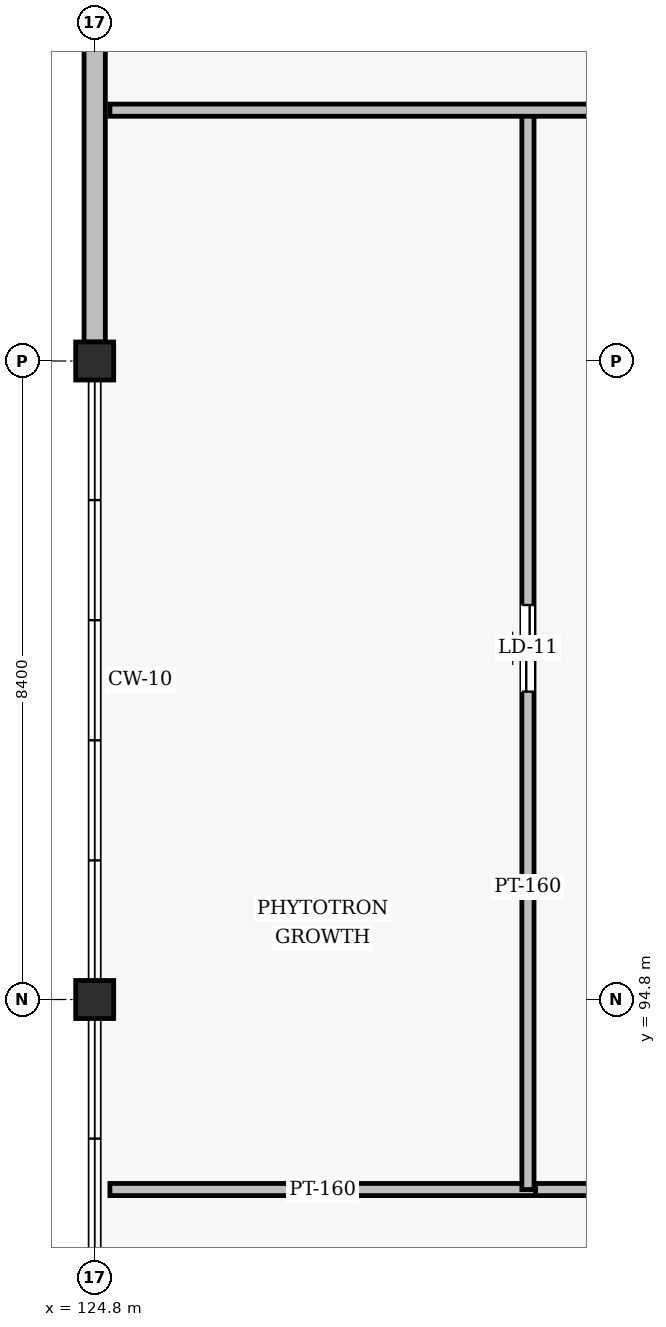
"""IFC4 building model, lengths in metres.
Left out: names, types, materials, properties, quantities, classifications, styles, units other than length and angle.
Written with IfcOpenShell. Run it as: python <this file> out.ifc"""

import sys

from ifc_helpers import new_model, si_unit, direction, frame, frame_2d, origin, origin_2d, place, context, subcontext, project, spatial, rectangle, hollow_rectangle, extrude, element, fill, save


model = new_model("IFC4")
c1 = context("Model", 3, precision=1e-05, world=origin(), true_north=direction((0.0, 1.0)))
c2 = subcontext(c1, "Body", "Model", "MODEL_VIEW")
j1 = project(units=[si_unit("LENGTHUNIT", "METRE"), si_unit("PLANEANGLEUNIT", "RADIAN")], contexts=[c1])
p1 = place(None, origin())
s1 = spatial("IfcSite", under=j1, at=p1, CompositionType="ELEMENT")
p2 = place(p1, origin())
s2 = spatial("IfcBuilding", under=s1, at=p2, CompositionType="ELEMENT")
p3 = place(p2, frame((0.0, 0.0, 35.4)))
s3 = spatial("IfcBuildingStorey", under=s2, at=p3, CompositionType="ELEMENT", Elevation=35.4)
for number, where, z_axis, x_axis in (
    (1, (124.8, 94.8, 0.0), (0.0, 0.0, 1.0), (1.0, 0.0, 0.0)),
    (2, (124.8, 103.2, 0.0), (0.0, 0.0, 1.0), (1.0, 0.0, 0.0)),
):
    element("IfcColumn", number, at=place(p3, frame(where, z_axis=z_axis, x_axis=x_axis)), inside=s3, PredefinedType="COLUMN", context=c2, shape_type="SweptSolid", body=[
        extrude(hollow_rectangle(XDim=0.5, YDim=0.5, WallThickness=0.02, InnerFilletRadius=0.02, OuterFilletRadius=0.04, at=origin_2d()), origin(), (0.0, 0.0, 1.0), 4.2),
    ])
p4 = place(p3, frame((124.8, 114.95, 0.0), z_axis=(0.0, 0.0, 1.0), x_axis=(0.0, -1.0, 0.0)))
e3 = element("IfcWall", 3, at=p4, inside=s3, PredefinedType="SOLIDWALL", context=c2, shape_type="SweptSolid", body=[
    extrude(rectangle(XDim=11.5, YDim=0.28, at=frame_2d((5.75, 0.0))), origin(), (0.0, 0.0, 1.0), 3.156),
])
p5 = place(p4, frame((3.258, 0.0, 0.9)))
e4 = element("IfcOpeningElement", 4, at=p5, cuts=e3, PredefinedType="OPENING", context=c2, shape_type="SweptSolid", body=[
    extrude(rectangle(XDim=1.15, YDim=1.96, at=frame_2d((0.575, 0.98))), frame((0.0, 0.15, 0.0), z_axis=(0.0, -1.0, 0.0), x_axis=(1.0, 0.0, 0.0)), (0.0, 0.0, 1.0), 0.3),
])
p6 = place(p3, frame((130.6, 92.3, 0.0), z_axis=(0.0, 0.0, 1.0), x_axis=(1.0, 0.0, 0.0)))
e5 = element("IfcWall", 5, at=p6, inside=s3, PredefinedType="PARTITIONING", context=c2, shape_type="SweptSolid", body=[
    extrude(rectangle(XDim=19.4, YDim=0.16, at=frame_2d((9.7, 0.0))), origin(), (0.0, 0.0, 1.0), 3.448),
])
p7 = place(p6, frame((9.1, 0.0, 0.0)))
e6 = element("IfcOpeningElement", 6, at=p7, cuts=e5, PredefinedType="OPENING", context=c2, shape_type="SweptSolid", body=[
    extrude(rectangle(XDim=1.25, YDim=2.12, at=frame_2d((0.625, 1.06))), frame((0.0, 0.09, 0.0), z_axis=(0.0, -1.0, 0.0), x_axis=(1.0, 0.0, 0.0)), (0.0, 0.0, 1.0), 0.18),
])
p8 = place(p3, frame((125.0, 92.3, 0.0), z_axis=(0.0, 0.0, 1.0), x_axis=(1.0, 0.0, 0.0)))
e7 = element("IfcWall", 7, at=p8, inside=s3, PredefinedType="PARTITIONING", context=c2, shape_type="SweptSolid", body=[
    extrude(rectangle(XDim=5.6, YDim=0.16, at=frame_2d((2.8, 0.0))), origin(), (0.0, 0.0, 1.0), 3.948),
])
p9 = place(p3, frame((130.5, 92.3, 0.0), z_axis=(0.0, 0.0, 1.0), x_axis=(0.0, 1.0, 0.0)))
e8 = element("IfcWall", 8, at=p9, inside=s3, PredefinedType="PARTITIONING", context=c2, shape_type="SweptSolid", body=[
    extrude(rectangle(XDim=14.2, YDim=0.16, at=frame_2d((7.1, 0.0))), origin(), (0.0, 0.0, 1.0), 3.452),
])
p10 = place(p9, frame((6.55, 0.0, 0.0)))
e9 = element("IfcOpeningElement", 9, at=p10, cuts=e8, PredefinedType="OPENING", context=c2, shape_type="SweptSolid", body=[
    extrude(rectangle(XDim=1.14, YDim=2.12, at=frame_2d((0.57, 1.06))), frame((0.0, 0.09, 0.0), z_axis=(0.0, -1.0, 0.0), x_axis=(1.0, 0.0, 0.0)), (0.0, 0.0, 1.0), 0.18),
])
p11 = place(p3, frame((125.0, 106.5, 0.0), z_axis=(0.0, 0.0, 1.0), x_axis=(1.0, 0.0, 0.0)))
e10 = element("IfcWall", 10, at=p11, inside=s3, PredefinedType="PARTITIONING", context=c2, shape_type="SweptSolid", body=[
    extrude(rectangle(XDim=15.0, YDim=0.16, at=frame_2d((7.5, 0.0))), origin(), (0.0, 0.0, 1.0), 3.248),
])
p12 = place(p11, frame((6.9, 0.0, 0.0)))
e11 = element("IfcOpeningElement", 11, at=p12, cuts=e10, PredefinedType="OPENING", context=c2, shape_type="SweptSolid", body=[
    extrude(rectangle(XDim=1.25, YDim=2.12, at=frame_2d((0.625, 1.06))), frame((0.0, 0.09, 0.0), z_axis=(0.0, -1.0, 0.0), x_axis=(1.0, 0.0, 0.0)), (0.0, 0.0, 1.0), 0.18),
])
p13 = place(p10, origin())
e12 = element("IfcDoor", 12, at=p13, inside=s3, OperationType="SINGLE_SWING_RIGHT", PredefinedType="DOOR", context=c2, shape_type="SweptSolid", body=[
    extrude(rectangle(XDim=1.14, YDim=2.12, at=frame_2d((0.57, 1.06))), frame((0.0, 0.025, 0.0), z_axis=(0.0, -1.0, 0.0), x_axis=(1.0, 0.0, 0.0)), (0.0, 0.0, 1.0), 0.05),
])
fill(e9, e12)
save(model, sys.argv[1])
